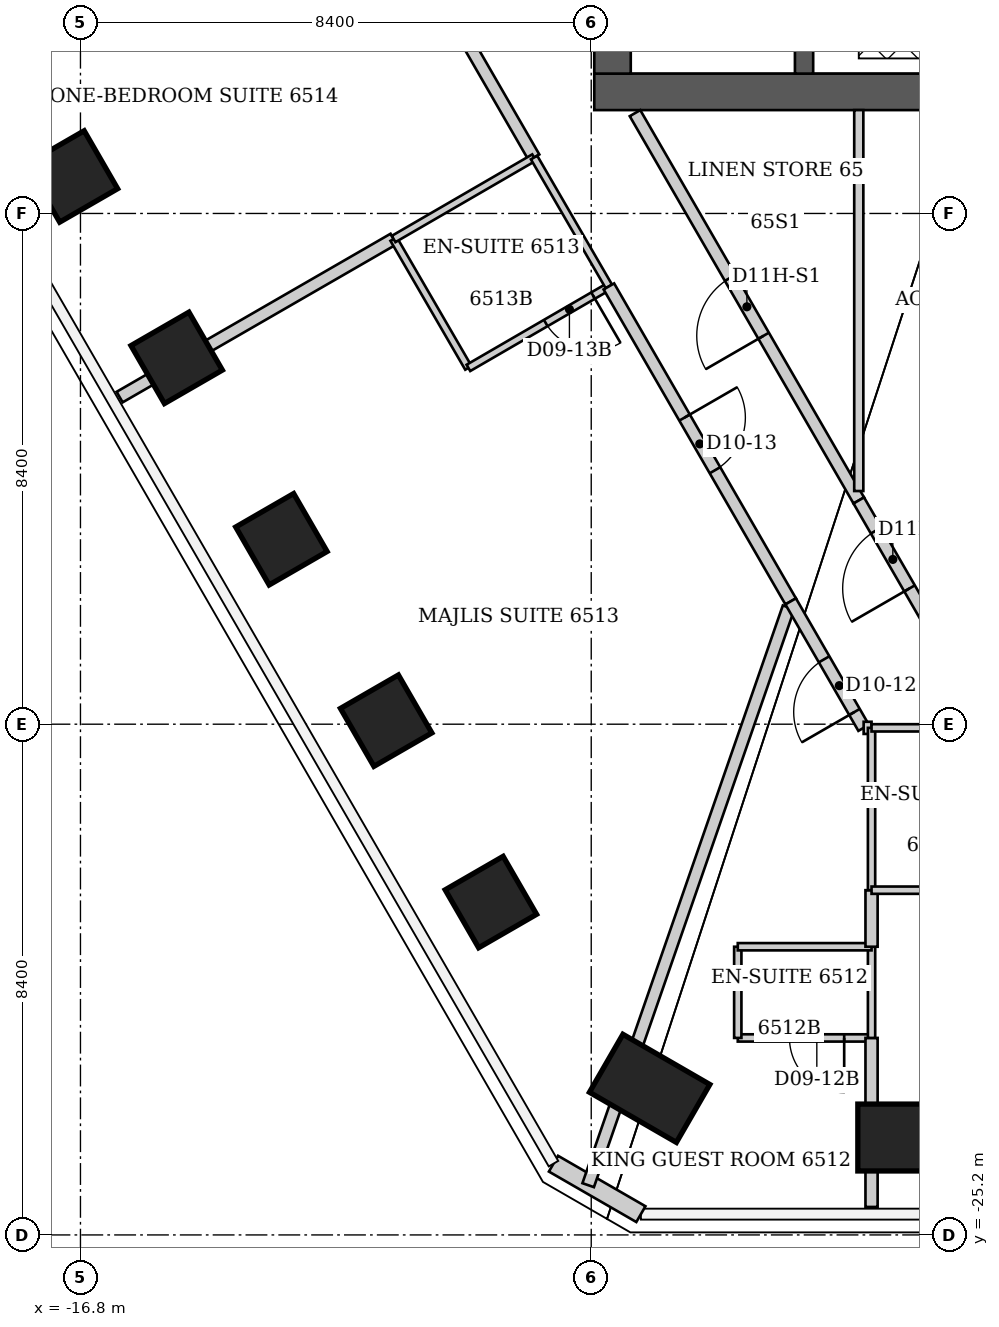
"""IFC4 building model, lengths in metres.
Left out: names, types, materials, properties, quantities, classifications, styles, units other than length and angle.
Written with IfcOpenShell. Run it as: python <this file> out.ifc"""

import sys

from ifc_helpers import new_model, si_unit, direction, frame, frame_2d, origin, origin_2d, place, context, subcontext, project, spatial, rectangle, extrude, element, fill, save


model = new_model("IFC4")
c1 = context("Model", 3, precision=1e-05, world=origin(), true_north=direction((0.0, 1.0)))
c2 = subcontext(c1, "Body", "Model", "MODEL_VIEW")
j1 = project(units=[si_unit("LENGTHUNIT", "METRE"), si_unit("PLANEANGLEUNIT", "RADIAN")], contexts=[c1])
p1 = place(None, origin())
s1 = spatial("IfcSite", under=j1, at=p1, CompositionType="ELEMENT")
p2 = place(p1, origin())
s2 = spatial("IfcBuilding", under=s1, at=p2, CompositionType="ELEMENT")
p3 = place(p2, frame((0.0, 0.0, 260.8)))
s3 = spatial("IfcBuildingStorey", under=s2, at=p3, CompositionType="ELEMENT", Elevation=260.8)
p4 = place(p3, frame((-3.466, -23.598, 0.0), z_axis=(0.0, 0.0, 1.0), x_axis=(0.0, -1.0, 0.0)))
e1 = element("IfcColumn", 1, at=p4, inside=s3, PredefinedType="COLUMN", context=c2, shape_type="SweptSolid", body=[
    extrude(rectangle(XDim=1.1, YDim=1.1, at=origin_2d()), origin(), (0.0, 0.0, 1.0), 3.8),
])
p5 = place(p3, frame((-7.439, -22.79, 0.0), z_axis=(0.0, 0.0, 1.0), x_axis=(-0.5, -0.866025403784, 0.0)))
e2 = element("IfcColumn", 2, at=p5, inside=s3, PredefinedType="COLUMN", context=c2, shape_type="SweptSolid", body=[
    extrude(rectangle(XDim=1.1, YDim=1.65, at=origin_2d()), origin(), (0.0, 0.0, 1.0), 3.8),
])
for number, where, z_axis, x_axis in (
    (3, (-10.05, -19.725, 0.0), (0.0, 0.0, 1.0), (-0.866, -0.5, 0.0)),
    (4, (-11.773, -16.742, 0.0), (0.0, 0.0, 1.0), (-0.866, -0.5, 0.0)),
    (5, (-13.495, -13.759, 0.0), (0.0, 0.0, 1.0), (-0.866, -0.5, 0.0)),
    (6, (-15.218, -10.775, 0.0), (0.0, 0.0, 1.0), (-0.866, -0.5, 0.0)),
    (7, (-16.94, -7.792, 0.0), (0.0, 0.0, 1.0), (-0.866, -0.5, 0.0)),
):
    element("IfcColumn", number, at=place(p3, frame(where, z_axis=z_axis, x_axis=x_axis)), inside=s3, PredefinedType="COLUMN", context=c2, shape_type="SweptSolid", body=[
        extrude(rectangle(XDim=1.1, YDim=1.1, at=origin_2d()), origin(), (0.0, 0.0, 1.0), 3.8),
    ])
p6 = place(p3, frame((-8.35, -6.4, 0.0), z_axis=(0.0, 0.0, 1.0), x_axis=(1.0, 0.0, 0.0)))
e8 = element("IfcWall", 8, at=p6, inside=s3, PredefinedType="SHEAR", context=c2, shape_type="SweptSolid", body=[
    extrude(rectangle(XDim=16.7, YDim=0.6, at=frame_2d((8.35, 0.0))), origin(), (0.0, 0.0, 1.0), 3.8),
])
p7 = place(p3, frame((-8.05, -6.1, 0.0), z_axis=(0.0, 0.0, 1.0), x_axis=(0.0, 1.0, 0.0)))
e9 = element("IfcWall", 9, at=p7, inside=s3, PredefinedType="SHEAR", context=c2, shape_type="SweptSolid", body=[
    extrude(rectangle(XDim=12.2, YDim=0.6, at=frame_2d((6.1, 0.0))), origin(), (0.0, 0.0, 1.0), 3.8),
])
p8 = place(p7, frame((7.6, 0.0, 0.0)))
e10 = element("IfcOpeningElement", 10, at=p8, cuts=e9, PredefinedType="OPENING", context=c2, shape_type="SweptSolid", body=[
    extrude(rectangle(XDim=1.2, YDim=2.2, at=frame_2d((0.6, 1.1))), frame((0.0, 0.3, 0.0), z_axis=(0.0, -1.0, 0.0), x_axis=(1.0, 0.0, 0.0)), (0.0, 0.0, 1.0), 0.6),
])
p9 = place(p3, frame((-4.9, -6.1, 0.0), z_axis=(0.0, 0.0, 1.0), x_axis=(0.0, 1.0, 0.0)))
e11 = element("IfcWall", 11, at=p9, inside=s3, PredefinedType="SHEAR", context=c2, shape_type="SweptSolid", body=[
    extrude(rectangle(XDim=7.2, YDim=0.3, at=frame_2d((3.6, 0.0))), origin(), (0.0, 0.0, 1.0), 3.8),
])
p10 = place(p3, frame((-7.583, -24.858, 0.0), z_axis=(0.0, 0.0, 1.0), x_axis=(-0.865989634427, 0.500061949227, 0.0)))
e12 = element("IfcWall", 12, at=p10, inside=s3, PredefinedType="SOLIDWALL", context=c2, shape_type="SweptSolid", body=[
    extrude(rectangle(XDim=1.66, YDim=0.3, at=frame_2d((0.83, 0.0))), origin(), (0.0, 0.0, 1.0), 3.64),
])
p11 = place(p3, frame((-16.156, -11.42, 0.0), z_axis=(0.0, 0.0, 1.0), x_axis=(0.866170741273, 0.499748183552, 0.0)))
e13 = element("IfcWall", 13, at=p11, inside=s3, PredefinedType="PARTITIONING", context=c2, shape_type="SweptSolid", body=[
    extrude(rectangle(XDim=5.202, YDim=0.2, at=frame_2d((2.601, 0.0))), origin(), (0.0, 0.0, 1.0), 3.64),
])
p12 = place(p3, frame((-12.79, -1.5, 0.0), z_axis=(0.0, 0.0, 1.0), x_axis=(0.499718371597, -0.866187940974, 0.0)))
e14 = element("IfcWall", 14, at=p12, inside=s3, PredefinedType="PARTITIONING", context=c2, shape_type="SweptSolid", body=[
    extrude(rectangle(XDim=6.904, YDim=0.2, at=frame_2d((3.452, 0.0))), origin(), (0.0, 0.0, 1.0), 3.64),
])
p13 = place(p12, frame((2.952, 0.0, 0.0)))
e15 = element("IfcOpeningElement", 15, at=p13, cuts=e14, PredefinedType="OPENING", context=c2, shape_type="SweptSolid", body=[
    extrude(rectangle(XDim=1.0, YDim=2.13, at=frame_2d((0.5, 1.065))), frame((0.0, 0.1, 0.0), z_axis=(0.0, -1.0, 0.0), x_axis=(1.0, 0.0, 0.0)), (0.0, 0.0, 1.0), 0.2),
])
p14 = place(p3, frame((-11.65, -8.82, 0.0), z_axis=(0.0, 0.0, 1.0), x_axis=(0.501856726365, -0.86495076519, 0.0)))
e16 = element("IfcWall", 16, at=p14, inside=s3, PredefinedType="PARTITIONING", context=c2, shape_type="SweptSolid", body=[
    extrude(rectangle(XDim=2.451, YDim=0.12, at=frame_2d((1.226, 0.0))), origin(), (0.0, 0.0, 1.0), 3.64),
])
p15 = place(p3, frame((-11.65, -8.82, 0.0), z_axis=(0.0, 0.0, 1.0), x_axis=(0.864966903181, 0.501828911485, 0.0)))
e17 = element("IfcWall", 17, at=p15, inside=s3, PredefinedType="PARTITIONING", context=c2, shape_type="SweptSolid", body=[
    extrude(rectangle(XDim=2.67, YDim=0.12, at=frame_2d((1.335, 0.0))), origin(), (0.0, 0.0, 1.0), 3.038),
])
p16 = place(p3, frame((-10.42, -10.94, 0.0), z_axis=(0.0, 0.0, 1.0), x_axis=(0.865006586495, 0.501760505939, 0.0)))
e18 = element("IfcWall", 18, at=p16, inside=s3, PredefinedType="PARTITIONING", context=c2, shape_type="SweptSolid", body=[
    extrude(rectangle(XDim=2.67, YDim=0.12, at=frame_2d((1.335, 0.0))), origin(), (0.0, 0.0, 1.0), 3.64),
])
p17 = place(p16, frame((1.47, 0.0, 0.0)))
e19 = element("IfcOpeningElement", 19, at=p17, cuts=e18, PredefinedType="OPENING", context=c2, shape_type="SweptSolid", body=[
    extrude(rectangle(XDim=0.9, YDim=2.03, at=frame_2d((0.45, 1.015))), frame((0.0, 0.06, 0.0), z_axis=(0.0, -1.0, 0.0), x_axis=(1.0, 0.0, 0.0)), (0.0, 0.0, 1.0), 0.12),
])
p18 = place(p3, frame((-9.34, -7.48, 0.0), z_axis=(0.0, 0.0, 1.0), x_axis=(0.501813488763, -0.864975850817, 0.0)))
e20 = element("IfcWall", 20, at=p18, inside=s3, PredefinedType="PARTITIONING", context=c2, shape_type="SweptSolid", body=[
    extrude(rectangle(XDim=2.451, YDim=0.12, at=frame_2d((1.226, 0.0))), origin(), (0.0, 0.0, 1.0), 3.64),
])
p19 = place(p3, frame((-8.45, -24.382, 0.0), z_axis=(0.0, 0.0, 1.0), x_axis=(0.327695764917, 0.944783300898, 0.0)))
e21 = element("IfcWall", 21, at=p19, inside=s3, PredefinedType="PARTITIONING", context=c2, shape_type="SweptSolid", body=[
    extrude(rectangle(XDim=10.058, YDim=0.2, at=frame_2d((5.029, 0.0))), origin(), (0.0, 0.0, 1.0), 3.64),
])
p20 = place(p3, frame((-8.11, -9.6, 0.0), z_axis=(0.0, 0.0, 1.0), x_axis=(0.49991915452, -0.866072074913, 0.0)))
e22 = element("IfcWall", 22, at=p20, inside=s3, PredefinedType="PARTITIONING", context=c2, shape_type="SweptSolid", body=[
    extrude(rectangle(XDim=5.981, YDim=0.2, at=frame_2d((2.99, 0.0))), origin(), (0.0, 0.0, 1.0), 3.64),
])
p21 = place(p20, frame((2.49, 0.0, 0.0)))
e23 = element("IfcOpeningElement", 23, at=p21, cuts=e22, PredefinedType="OPENING", context=c2, shape_type="SweptSolid", body=[
    extrude(rectangle(XDim=1.0, YDim=2.13, at=frame_2d((0.5, 1.065))), frame((0.0, 0.1, 0.0), z_axis=(0.0, -1.0, 0.0), x_axis=(1.0, 0.0, 0.0)), (0.0, 0.0, 1.0), 0.2),
])
p22 = place(p3, frame((-5.99, -21.96, 0.0), z_axis=(0.0, 0.0, 1.0), x_axis=(1.0, 0.0, 0.0)))
e24 = element("IfcWall", 24, at=p22, inside=s3, PredefinedType="PARTITIONING", context=c2, shape_type="SweptSolid", body=[
    extrude(rectangle(XDim=2.2, YDim=0.12, at=frame_2d((1.1, 0.0))), origin(), (0.0, 0.0, 1.0), 3.64),
])
p23 = place(p22, frame((0.85, 0.0, 0.0)))
e25 = element("IfcOpeningElement", 25, at=p23, cuts=e24, PredefinedType="OPENING", context=c2, shape_type="SweptSolid", body=[
    extrude(rectangle(XDim=0.9, YDim=2.03, at=frame_2d((0.45, 1.015))), frame((0.0, 0.06, 0.0), z_axis=(0.0, -1.0, 0.0), x_axis=(1.0, 0.0, 0.0)), (0.0, 0.0, 1.0), 0.12),
])
p24 = place(p3, frame((-5.99, -20.46, 0.0), z_axis=(0.0, 0.0, 1.0), x_axis=(0.0, -1.0, 0.0)))
e26 = element("IfcWall", 26, at=p24, inside=s3, PredefinedType="PARTITIONING", context=c2, shape_type="SweptSolid", body=[
    extrude(rectangle(XDim=1.5, YDim=0.12, at=frame_2d((0.75, 0.0))), origin(), (0.0, 0.0, 1.0), 3.64),
])
p25 = place(p3, frame((-5.12, -14.78, 0.0), z_axis=(0.0, 0.0, 1.0), x_axis=(0.499813401482, -0.866133109688, 0.0)))
e27 = element("IfcWall", 27, at=p25, inside=s3, PredefinedType="PARTITIONING", context=c2, shape_type="SweptSolid", body=[
    extrude(rectangle(XDim=2.401, YDim=0.2, at=frame_2d((1.201, 0.0))), origin(), (0.0, 0.0, 1.0), 3.64),
])
p26 = place(p25, frame((1.1, 0.0, 0.0)))
e28 = element("IfcOpeningElement", 28, at=p26, cuts=e27, PredefinedType="OPENING", context=c2, shape_type="SweptSolid", body=[
    extrude(rectangle(XDim=1.0, YDim=2.13, at=frame_2d((0.5, 1.065))), frame((0.0, 0.1, 0.0), z_axis=(0.0, -1.0, 0.0), x_axis=(1.0, 0.0, 0.0)), (0.0, 0.0, 1.0), 0.2),
])
p27 = place(p3, frame((-4.0, -13.12, 0.0), z_axis=(0.0, 0.0, 1.0), x_axis=(-0.500218436225, 0.865899252835, 0.0)))
e29 = element("IfcWall", 29, at=p27, inside=s3, PredefinedType="PARTITIONING", context=c2, shape_type="SweptSolid", body=[
    extrude(rectangle(XDim=7.357, YDim=0.2, at=frame_2d((3.678, 0.0))), origin(), (0.0, 0.0, 1.0), 3.64),
])
p28 = place(p27, frame((3.128, 0.0, 0.0)))
e30 = element("IfcOpeningElement", 30, at=p28, cuts=e29, PredefinedType="OPENING", context=c2, shape_type="SweptSolid", body=[
    extrude(rectangle(XDim=1.1, YDim=2.2, at=frame_2d((0.55, 1.1))), frame((0.0, 0.1, 0.0), z_axis=(0.0, -1.0, 0.0), x_axis=(1.0, 0.0, 0.0)), (0.0, 0.0, 1.0), 0.2),
])
p29 = place(p3, frame((-4.0, -6.7, 0.0), z_axis=(0.0, 0.0, 1.0), x_axis=(0.0, -1.0, 0.0)))
e31 = element("IfcWall", 31, at=p29, inside=s3, PredefinedType="PARTITIONING", context=c2, shape_type="SweptSolid", body=[
    extrude(rectangle(XDim=6.265, YDim=0.15, at=frame_2d((3.133, 0.0))), origin(), (0.0, 0.0, 1.0), 3.64),
])
p30 = place(p3, frame((-3.92, -16.86, 0.0), z_axis=(0.0, 0.0, 1.0), x_axis=(1.0, 0.0, 0.0)))
e32 = element("IfcWall", 32, at=p30, inside=s3, PredefinedType="PARTITIONING", context=c2, shape_type="SweptSolid", body=[
    extrude(rectangle(XDim=0.13, YDim=0.2, at=frame_2d((0.065, 0.0))), origin(), (0.0, 0.0, 1.0), 3.64),
])
p31 = place(p3, frame((-3.79, -24.74, 0.0), z_axis=(0.0, 0.0, 1.0), x_axis=(0.0, 1.0, 0.0)))
e33 = element("IfcWall", 33, at=p31, inside=s3, PredefinedType="PARTITIONING", context=c2, shape_type="SweptSolid", body=[
    extrude(rectangle(XDim=2.78, YDim=0.2, at=frame_2d((1.39, 0.0))), origin(), (0.0, 0.0, 1.0), 3.64),
])
p32 = place(p3, frame((-3.79, -21.96, 0.0), z_axis=(0.0, 0.0, 1.0), x_axis=(0.0, 1.0, 0.0)))
e34 = element("IfcWall", 34, at=p32, inside=s3, PredefinedType="PARTITIONING", context=c2, shape_type="SweptSolid", body=[
    extrude(rectangle(XDim=1.5, YDim=0.12, at=frame_2d((0.75, 0.0))), origin(), (0.0, 0.0, 1.0), 3.64),
])
p33 = place(p3, frame((-3.79, -20.46, 0.0), z_axis=(0.0, 0.0, 1.0), x_axis=(-1.0, 0.0, 0.0)))
e35 = element("IfcWall", 35, at=p33, inside=s3, PredefinedType="PARTITIONING", context=c2, shape_type="SweptSolid", body=[
    extrude(rectangle(XDim=2.2, YDim=0.12, at=frame_2d((1.1, 0.0))), origin(), (0.0, 0.0, 1.0), 3.64),
])
p34 = place(p3, frame((-3.79, -20.46, 0.0), z_axis=(0.0, 0.0, 1.0), x_axis=(0.0, 1.0, 0.0)))
e36 = element("IfcWall", 36, at=p34, inside=s3, PredefinedType="PARTITIONING", context=c2, shape_type="SweptSolid", body=[
    extrude(rectangle(XDim=0.93, YDim=0.2, at=frame_2d((0.465, 0.0))), origin(), (0.0, 0.0, 1.0), 3.64),
])
p35 = place(p3, frame((-3.79, -19.53, 0.0), z_axis=(0.0, 0.0, 1.0), x_axis=(0.0, 1.0, 0.0)))
e37 = element("IfcWall", 37, at=p35, inside=s3, PredefinedType="PARTITIONING", context=c2, shape_type="SweptSolid", body=[
    extrude(rectangle(XDim=2.67, YDim=0.12, at=frame_2d((1.335, 0.0))), origin(), (0.0, 0.0, 1.0), 3.64),
])
for number, where, z_axis, x_axis in (
    (38, (-3.79, -19.53, 0.0), (0.0, 0.0, 1.0), (1.0, 0.0, 0.0)),
    (39, (-3.79, -16.86, 0.0), (0.0, 0.0, 1.0), (1.0, 0.0, 0.0)),
):
    element("IfcWall", number, at=place(p3, frame(where, z_axis=z_axis, x_axis=x_axis)), inside=s3, PredefinedType="PARTITIONING", context=c2, shape_type="SweptSolid", body=[
        extrude(rectangle(XDim=2.45, YDim=0.12, at=frame_2d((1.225, 0.0))), origin(), (0.0, 0.0, 1.0), 3.64),
    ])
p36 = place(p3, frame((-2.88, -15.06, 0.0), z_axis=(0.0, 0.0, 1.0), x_axis=(-0.499983441833, 0.866034963436, 0.0)))
e40 = element("IfcWall", 40, at=p36, inside=s3, PredefinedType="PARTITIONING", context=c2, shape_type="SweptSolid", body=[
    extrude(rectangle(XDim=2.24, YDim=0.2, at=frame_2d((1.12, 0.0))), origin(), (0.0, 0.0, 1.0), 3.64),
])
p37 = place(p36, frame((0.57, 0.0, 0.0)))
e41 = element("IfcOpeningElement", 41, at=p37, cuts=e40, PredefinedType="OPENING", context=c2, shape_type="SweptSolid", body=[
    extrude(rectangle(XDim=1.1, YDim=2.2, at=frame_2d((0.55, 1.1))), frame((0.0, 0.1, 0.0), z_axis=(0.0, -1.0, 0.0), x_axis=(1.0, 0.0, 0.0)), (0.0, 0.0, 1.0), 0.2),
])
p38 = place(p26, origin())
e42 = element("IfcDoor", 42, at=p38, inside=s3, OperationType="SINGLE_SWING_RIGHT", PredefinedType="DOOR", context=c2, shape_type="SweptSolid", body=[
    extrude(rectangle(XDim=1.0, YDim=2.13, at=frame_2d((0.5, 1.065))), frame((0.0, 0.025, 0.0), z_axis=(0.0, -1.0, 0.0), x_axis=(1.0, 0.0, 0.0)), (0.0, 0.0, 1.0), 0.05),
])
fill(e28, e42)
p39 = place(p23, origin())
e43 = element("IfcDoor", 43, at=p39, inside=s3, OperationType="SINGLE_SWING_RIGHT", PredefinedType="DOOR", context=c2, shape_type="SweptSolid", body=[
    extrude(rectangle(XDim=0.9, YDim=2.03, at=frame_2d((0.45, 1.015))), frame((0.0, 0.025, 0.0), z_axis=(0.0, -1.0, 0.0), x_axis=(1.0, 0.0, 0.0)), (0.0, 0.0, 1.0), 0.05),
])
fill(e25, e43)
p40 = place(p21, origin())
e44 = element("IfcDoor", 44, at=p40, inside=s3, OperationType="SINGLE_SWING_LEFT", PredefinedType="DOOR", context=c2, shape_type="SweptSolid", body=[
    extrude(rectangle(XDim=1.0, YDim=2.13, at=frame_2d((0.5, 1.065))), frame((0.0, 0.025, 0.0), z_axis=(0.0, -1.0, 0.0), x_axis=(1.0, 0.0, 0.0)), (0.0, 0.0, 1.0), 0.05),
])
fill(e23, e44)
p41 = place(p17, origin())
e45 = element("IfcDoor", 45, at=p41, inside=s3, OperationType="SINGLE_SWING_RIGHT", PredefinedType="DOOR", context=c2, shape_type="SweptSolid", body=[
    extrude(rectangle(XDim=0.9, YDim=2.03, at=frame_2d((0.45, 1.015))), frame((0.0, 0.025, 0.0), z_axis=(0.0, -1.0, 0.0), x_axis=(1.0, 0.0, 0.0)), (0.0, 0.0, 1.0), 0.05),
])
fill(e19, e45)
p42 = place(p28, origin())
e46 = element("IfcDoor", 46, at=p42, inside=s3, OperationType="SINGLE_SWING_LEFT", PredefinedType="DOOR", context=c2, shape_type="SweptSolid", body=[
    extrude(rectangle(XDim=1.1, YDim=2.2, at=frame_2d((0.55, 1.1))), frame((0.0, 0.025, 0.0), z_axis=(0.0, -1.0, 0.0), x_axis=(1.0, 0.0, 0.0)), (0.0, 0.0, 1.0), 0.05),
])
fill(e30, e46)
p43 = place(p37, origin())
e47 = element("IfcDoor", 47, at=p43, inside=s3, OperationType="SINGLE_SWING_LEFT", PredefinedType="DOOR", context=c2, shape_type="SweptSolid", body=[
    extrude(rectangle(XDim=1.1, YDim=2.2, at=frame_2d((0.55, 1.1))), frame((0.0, 0.025, 0.0), z_axis=(0.0, -1.0, 0.0), x_axis=(1.0, 0.0, 0.0)), (0.0, 0.0, 1.0), 0.05),
])
fill(e41, e47)
save(model, sys.argv[1])
